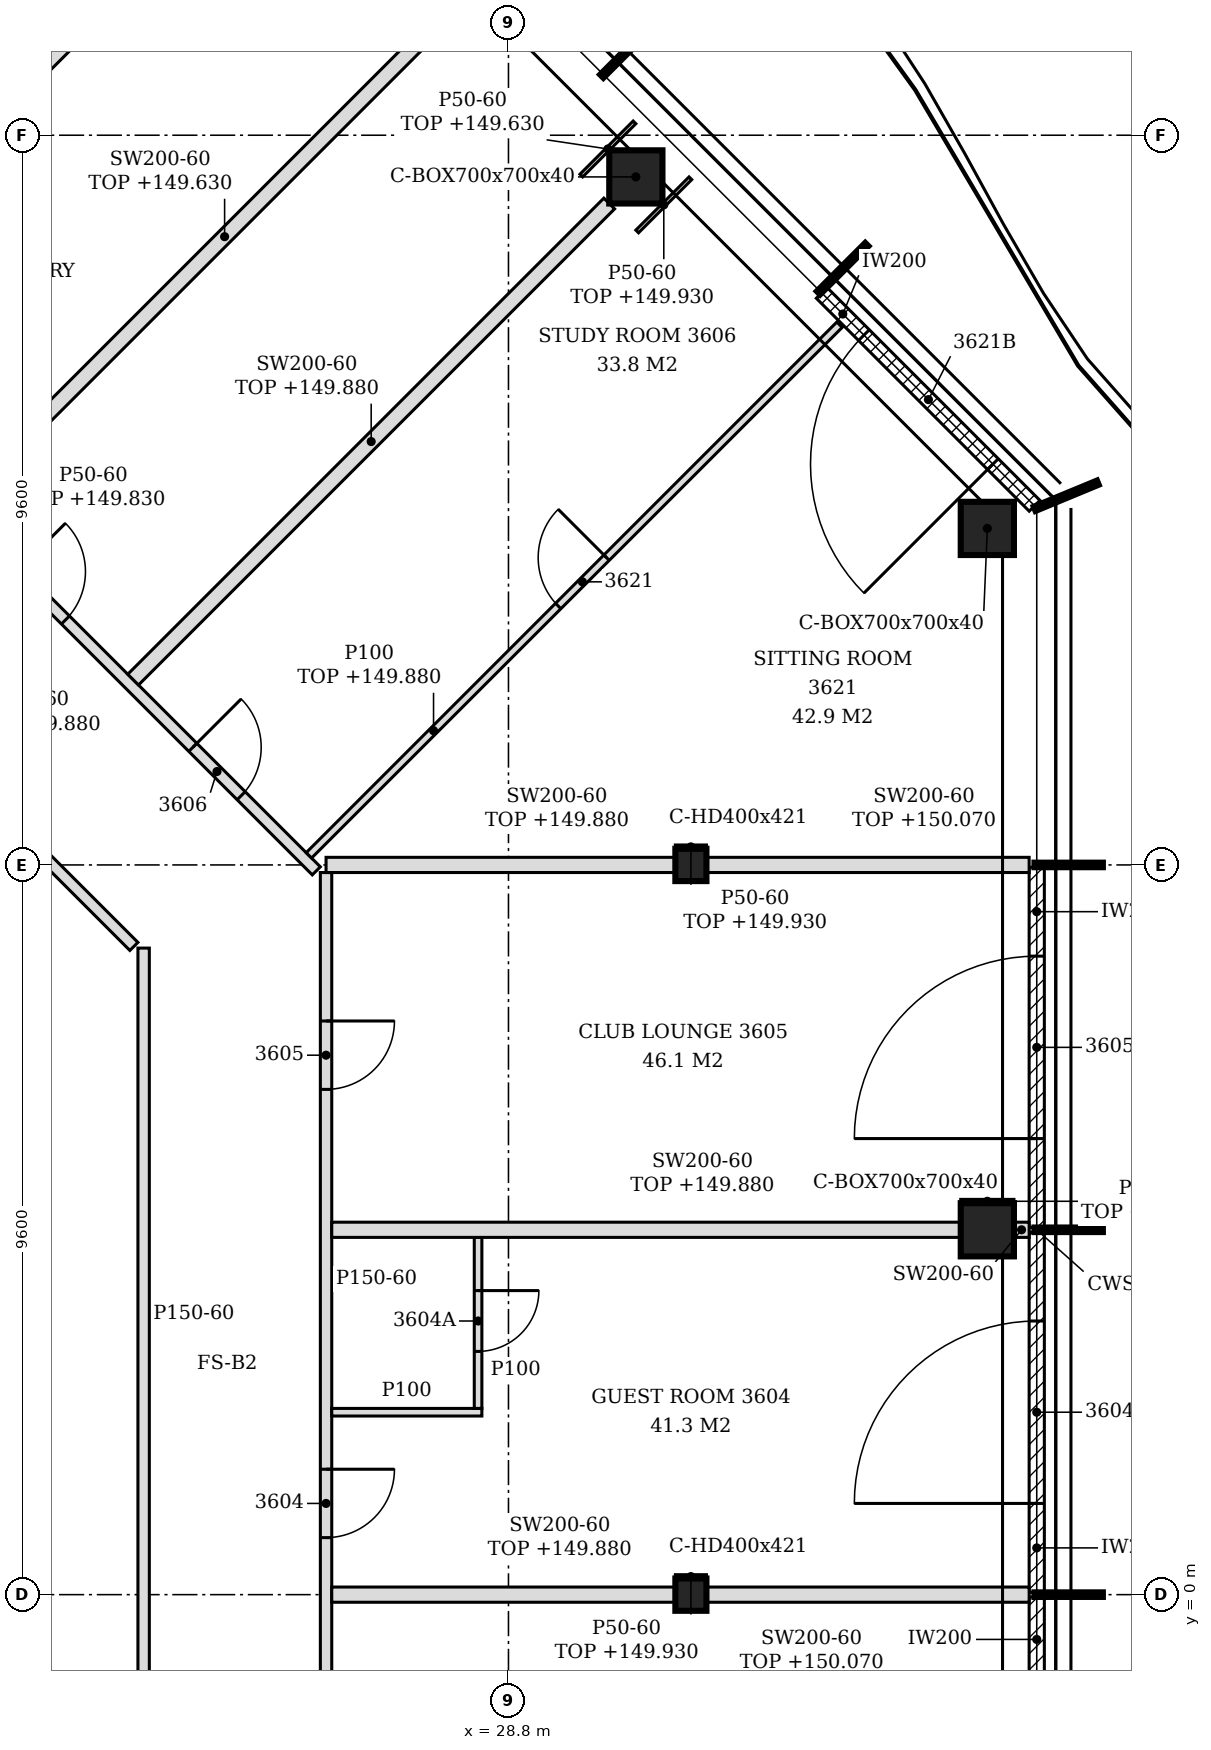
"""IFC4 building model, lengths in metres.
Left out: names, types, materials, properties, quantities, classifications, styles, units other than length and angle.
Written with IfcOpenShell. Run it as: python <this file> out.ifc"""

import sys

from ifc_helpers import new_model, si_unit, direction, frame, frame_2d, origin, origin_2d, place, context, subcontext, project, spatial, polyline, rectangle, hollow_rectangle, i_section, outline, extrude, element, fill, save


model = new_model("IFC4")
c1 = context("Model", 3, precision=1e-05, world=origin(), true_north=direction((0.0, 1.0)))
c2 = subcontext(c1, "Body", "Model", "MODEL_VIEW")
j1 = project(units=[si_unit("LENGTHUNIT", "METRE"), si_unit("PLANEANGLEUNIT", "RADIAN")], contexts=[c1])
p1 = place(None, origin())
s1 = spatial("IfcSite", under=j1, at=p1, CompositionType="ELEMENT")
p2 = place(p1, origin())
s2 = spatial("IfcBuilding", under=s1, at=p2, CompositionType="ELEMENT")
p3 = place(p2, frame((0.0, 0.0, 147.0)))
s3 = spatial("IfcBuildingStorey", under=s2, at=p3, CompositionType="ELEMENT", Elevation=147.0)
for number, where, z_axis, x_axis in (
    (1, (35.1, 4.8, -0.15), (0.0, 0.0, 1.0), (1.0, 0.0, 0.0)),
    (2, (35.1, 14.027, -0.15), (0.0, 0.0, 1.0), (1.0, 0.0, 0.0)),
    (3, (30.476, 18.652, -0.15), (0.0, 0.0, 1.0), (1.0, 0.0, 0.0)),
):
    element("IfcColumn", number, at=place(p3, frame(where, z_axis=z_axis, x_axis=x_axis)), inside=s3, PredefinedType="COLUMN", context=c2, shape_type="SweptSolid", body=[
        extrude(hollow_rectangle(XDim=0.7, YDim=0.7, WallThickness=0.04, at=origin_2d()), origin(), (0.0, 0.0, 1.0), 3.6),
    ])
for number, where, z_axis, x_axis in (
    (4, (31.2, 0.0, -0.15), (0.0, 0.0, 1.0), (1.0, 0.0, 0.0)),
    (5, (31.2, 9.6, -0.15), (0.0, 0.0, 1.0), (1.0, 0.0, 0.0)),
):
    element("IfcColumn", number, at=place(p3, frame(where, z_axis=z_axis, x_axis=x_axis)), inside=s3, PredefinedType="COLUMN", context=c2, shape_type="SweptSolid", body=[
        extrude(i_section(OverallWidth=0.409, OverallDepth=0.425, WebThickness=0.033, FlangeThickness=0.052, FilletRadius=0.015, at=origin_2d()), origin(), (0.0, 0.0, 1.0), 3.6),
    ])
p4 = place(p3, frame((35.75, -4.656, 0.0), z_axis=(0.0, 0.0, 1.0), x_axis=(0.0, 1.0, 0.0)))
e6 = element("IfcWall", 6, at=p4, inside=s3, PredefinedType="NOTDEFINED", context=c2, shape_type="SweptSolid", body=[
    extrude(rectangle(XDim=4.626, YDim=0.2, at=frame_2d((2.313, 0.0))), origin(), (0.0, 0.0, 1.0), 3.45),
])
p5 = place(p4, frame((1.108, 0.0, 0.0)))
e7 = element("IfcOpeningElement", 7, at=p5, cuts=e6, PredefinedType="OPENING", context=c2, shape_type="SweptSolid", body=[
    extrude(rectangle(XDim=2.4, YDim=2.4, at=frame_2d((1.2, 1.2))), frame((0.0, 0.11, 0.0), z_axis=(0.0, -1.0, 0.0), x_axis=(1.0, 0.0, 0.0)), (0.0, 0.0, 1.0), 0.22),
])
p6 = place(p3, frame((35.75, 0.03, 0.0), z_axis=(0.0, 0.0, 1.0), x_axis=(0.0, 1.0, 0.0)))
e8 = element("IfcWall", 8, at=p6, inside=s3, PredefinedType="NOTDEFINED", context=c2, shape_type="SweptSolid", body=[
    extrude(rectangle(XDim=4.74, YDim=0.2, at=frame_2d((2.37, 0.0))), origin(), (0.0, 0.0, 1.0), 3.45),
])
p7 = place(p6, frame((1.17, 0.0, 0.0)))
e9 = element("IfcOpeningElement", 9, at=p7, cuts=e8, PredefinedType="OPENING", context=c2, shape_type="SweptSolid", body=[
    extrude(rectangle(XDim=2.4, YDim=2.4, at=frame_2d((1.2, 1.2))), frame((0.0, 0.11, 0.0), z_axis=(0.0, -1.0, 0.0), x_axis=(1.0, 0.0, 0.0)), (0.0, 0.0, 1.0), 0.22),
])
p8 = place(p3, frame((35.75, 4.83, 0.0), z_axis=(0.0, 0.0, 1.0), x_axis=(0.0, 1.0, 0.0)))
e10 = element("IfcWall", 10, at=p8, inside=s3, PredefinedType="NOTDEFINED", context=c2, shape_type="SweptSolid", body=[
    extrude(rectangle(XDim=4.74, YDim=0.2, at=frame_2d((2.37, 0.0))), origin(), (0.0, 0.0, 1.0), 3.45),
])
p9 = place(p8, frame((1.17, 0.0, 0.0)))
e11 = element("IfcOpeningElement", 11, at=p9, cuts=e10, PredefinedType="OPENING", context=c2, shape_type="SweptSolid", body=[
    extrude(rectangle(XDim=2.4, YDim=2.4, at=frame_2d((1.2, 1.2))), frame((0.0, 0.11, 0.0), z_axis=(0.0, -1.0, 0.0), x_axis=(1.0, 0.0, 0.0)), (0.0, 0.0, 1.0), 0.22),
])
p10 = place(p3, frame((35.722, 14.325, 0.0), z_axis=(0.0, 0.0, 1.0), x_axis=(-0.707106781187, 0.707106781187, 0.0)))
e12 = element("IfcWall", 12, at=p10, inside=s3, PredefinedType="NOTDEFINED", context=c2, shape_type="SweptSolid", body=[
    extrude(rectangle(XDim=3.962, YDim=0.2, at=frame_2d((1.981, 0.0))), origin(), (0.0, 0.0, 1.0), 3.45),
])
p11 = place(p10, frame((0.775, 0.0, 0.0)))
e13 = element("IfcOpeningElement", 13, at=p11, cuts=e12, PredefinedType="OPENING", context=c2, shape_type="SweptSolid", body=[
    extrude(rectangle(XDim=2.4, YDim=2.4, at=frame_2d((1.2, 1.2))), frame((0.0, 0.11, 0.0), z_axis=(0.0, -1.0, 0.0), x_axis=(1.0, 0.0, 0.0)), (0.0, 0.0, 1.0), 0.22),
])
p12 = place(p3, frame((26.4, -4.448, 0.0), z_axis=(0.0, 0.0, 1.0), x_axis=(0.0, 1.0, 0.0)))
e14 = element("IfcWall", 14, at=p12, inside=s3, PredefinedType="PARTITIONING", context=c2, shape_type="SweptSolid", body=[
    extrude(outline(polyline([(0.0, 0.0), (13.948, 0.0), (13.948, 2.88), (13.943, 2.88), (13.941, 3.45), (9.353, 3.45), (9.351, 2.88), (9.143, 2.88), (9.141, 3.45), (4.553, 3.45), (4.551, 2.88), (4.343, 2.88), (4.341, 3.45), (0.0, 3.45), (0.0, 0.0)])), frame((0.0, 0.075, 0.0), z_axis=(0.0, -1.0, 0.0), x_axis=(1.0, 0.0, 0.0)), (0.0, 0.0, 1.0), 0.15),
])
p13 = place(p12, frame((1.701, 0.0, 0.0)))
e15 = element("IfcOpeningElement", 15, at=p13, cuts=e14, PredefinedType="OPENING", context=c2, shape_type="SweptSolid", body=[
    extrude(rectangle(XDim=0.9, YDim=2.1, at=frame_2d((0.45, 1.05))), frame((0.0, 0.085, 0.0), z_axis=(0.0, -1.0, 0.0), x_axis=(1.0, 0.0, 0.0)), (0.0, 0.0, 1.0), 0.17),
])
p14 = place(p12, frame((5.198, 0.0, 0.0)))
e16 = element("IfcOpeningElement", 16, at=p14, cuts=e14, PredefinedType="OPENING", context=c2, shape_type="SweptSolid", body=[
    extrude(rectangle(XDim=0.9, YDim=2.1, at=frame_2d((0.45, 1.05))), frame((0.0, 0.085, 0.0), z_axis=(0.0, -1.0, 0.0), x_axis=(1.0, 0.0, 0.0)), (0.0, 0.0, 1.0), 0.17),
])
p15 = place(p12, frame((11.095, 0.0, 0.0)))
e17 = element("IfcOpeningElement", 17, at=p15, cuts=e14, PredefinedType="OPENING", context=c2, shape_type="SweptSolid", body=[
    extrude(rectangle(XDim=0.9, YDim=2.1, at=frame_2d((0.45, 1.05))), frame((0.0, 0.085, 0.0), z_axis=(0.0, -1.0, 0.0), x_axis=(1.0, 0.0, 0.0)), (0.0, 0.0, 1.0), 0.17),
])
p16 = place(p3, frame((24.0, -1.125, 0.0), z_axis=(0.0, 0.0, 1.0), x_axis=(0.0, 1.0, 0.0)))
e18 = element("IfcWall", 18, at=p16, inside=s3, PredefinedType="PARTITIONING", context=c2, shape_type="SweptSolid", body=[
    extrude(outline(polyline([(0.0, 0.0), (9.631, 0.0), (9.631, 3.45), (6.03, 3.45), (6.028, 2.88), (5.82, 2.88), (5.818, 3.45), (1.23, 3.45), (1.228, 2.88), (1.02, 2.88), (1.018, 3.45), (0.0, 3.45), (0.0, 0.0)])), frame((0.0, 0.075, 0.0), z_axis=(0.0, -1.0, 0.0), x_axis=(1.0, 0.0, 0.0)), (0.0, 0.0, 1.0), 0.15),
])
p17 = place(p3, frame((26.475, 0.0, 0.0), z_axis=(0.0, 0.0, 1.0), x_axis=(1.0, 0.0, 0.0)))
e19 = element("IfcWall", 19, at=p17, inside=s3, PredefinedType="PARTITIONING", context=c2, shape_type="SweptSolid", body=[
    extrude(rectangle(XDim=4.521, YDim=0.2, at=frame_2d((2.26, 0.0))), origin(), (0.0, 0.0, 1.0), 2.88),
])
p18 = place(p3, frame((31.405, 0.0, 0.0), z_axis=(0.0, 0.0, 1.0), x_axis=(1.0, 0.0, 0.0)))
e20 = element("IfcWall", 20, at=p18, inside=s3, PredefinedType="PARTITIONING", context=c2, shape_type="SweptSolid", body=[
    extrude(outline(polyline([(0.0, 0.0), (4.245, 0.0), (4.246, 3.07), (3.845, 3.07), (3.844, 2.93), (3.545, 2.93), (3.543, 3.07), (0.0, 3.07), (0.0, 0.0)])), frame((0.0, 0.1, 0.0), z_axis=(0.0, -1.0, 0.0), x_axis=(1.0, 0.0, 0.0)), (0.0, 0.0, 1.0), 0.2),
])
p19 = place(p3, frame((26.475, 2.4, 0.0), z_axis=(0.0, 0.0, 1.0), x_axis=(1.0, 0.0, 0.0)))
e21 = element("IfcWall", 21, at=p19, inside=s3, PredefinedType="PARTITIONING", context=c2, shape_type="SweptSolid", body=[
    extrude(rectangle(XDim=1.975, YDim=0.1, at=frame_2d((0.987, 0.0))), origin(), (0.0, 0.0, 1.0), 3.45),
])
p20 = place(p3, frame((28.4, 2.45, 0.0), z_axis=(0.0, 0.0, 1.0), x_axis=(0.0, 1.0, 0.0)))
e22 = element("IfcWall", 22, at=p20, inside=s3, PredefinedType="PARTITIONING", context=c2, shape_type="SweptSolid", body=[
    extrude(outline(polyline([(0.0, 0.0), (2.25, 0.0), (2.25, 2.88), (2.245, 2.88), (2.243, 3.45), (0.0, 3.45), (0.0, 0.0)])), frame((0.0, 0.05, 0.0), z_axis=(0.0, -1.0, 0.0), x_axis=(1.0, 0.0, 0.0)), (0.0, 0.0, 1.0), 0.1),
])
p21 = place(p20, frame((0.75, 0.0, 0.0)))
e23 = element("IfcOpeningElement", 23, at=p21, cuts=e22, PredefinedType="OPENING", context=c2, shape_type="SweptSolid", body=[
    extrude(rectangle(XDim=0.8, YDim=2.1, at=frame_2d((0.4, 1.05))), frame((0.0, 0.06, 0.0), z_axis=(0.0, -1.0, 0.0), x_axis=(1.0, 0.0, 0.0)), (0.0, 0.0, 1.0), 0.12),
])
p22 = place(p3, frame((26.475, 4.8, 0.0), z_axis=(0.0, 0.0, 1.0), x_axis=(1.0, 0.0, 0.0)))
e24 = element("IfcWall", 24, at=p22, inside=s3, PredefinedType="PARTITIONING", context=c2, shape_type="SweptSolid", body=[
    extrude(rectangle(XDim=8.275, YDim=0.2, at=frame_2d((4.137, 0.0))), origin(), (0.0, 0.0, 1.0), 2.88),
])
p23 = place(p3, frame((35.45, 4.8, 0.0), z_axis=(0.0, 0.0, 1.0), x_axis=(1.0, 0.0, 0.0)))
e25 = element("IfcWall", 25, at=p23, inside=s3, PredefinedType="PARTITIONING", context=c2, shape_type="SweptSolid", body=[
    extrude(rectangle(XDim=0.2, YDim=0.2, at=frame_2d((0.1, 0.0))), origin(), (0.0, 0.0, 1.0), 3.45),
])
p24 = place(p3, frame((23.872, 8.528, 0.0), z_axis=(0.0, 0.0, 1.0), x_axis=(-0.707126119272, 0.707087442572, 0.0)))
e26 = element("IfcWall", 26, at=p24, inside=s3, PredefinedType="PARTITIONING", context=c2, shape_type="SweptSolid", body=[
    extrude(rectangle(XDim=6.312, YDim=0.15, at=frame_2d((3.156, 0.0))), origin(), (0.0, 0.0, 1.0), 2.88),
])
p25 = place(p3, frame((26.272, 9.522, 0.0), z_axis=(0.0, 0.0, 1.0), x_axis=(-0.707097742657, 0.707115819601, 0.0)))
e27 = element("IfcWall", 27, at=p25, inside=s3, PredefinedType="PARTITIONING", context=c2, shape_type="SweptSolid", body=[
    extrude(rectangle(XDim=13.506, YDim=0.15, at=frame_2d((6.753, 0.0))), origin(), (0.0, 0.0, 1.0), 2.73),
])
p26 = place(p25, frame((1.398, 0.0, 0.0)))
e28 = element("IfcOpeningElement", 28, at=p26, cuts=e27, PredefinedType="OPENING", context=c2, shape_type="SweptSolid", body=[
    extrude(rectangle(XDim=0.9, YDim=2.1, at=frame_2d((0.45, 1.05))), frame((0.0, 0.085, 0.0), z_axis=(0.0, -1.0, 0.0), x_axis=(1.0, 0.0, 0.0)), (0.0, 0.0, 1.0), 0.17),
])
p27 = place(p25, frame((4.668, 0.0, 0.0)))
e29 = element("IfcOpeningElement", 29, at=p27, cuts=e27, PredefinedType="OPENING", context=c2, shape_type="SweptSolid", body=[
    extrude(rectangle(XDim=0.9, YDim=2.1, at=frame_2d((0.45, 1.05))), frame((0.0, 0.085, 0.0), z_axis=(0.0, -1.0, 0.0), x_axis=(1.0, 0.0, 0.0)), (0.0, 0.0, 1.0), 0.17),
])
p28 = place(p25, frame((7.938, 0.0, 0.0)))
e30 = element("IfcOpeningElement", 30, at=p28, cuts=e27, PredefinedType="OPENING", context=c2, shape_type="SweptSolid", body=[
    extrude(rectangle(XDim=0.9, YDim=2.1, at=frame_2d((0.45, 1.05))), frame((0.0, 0.085, 0.0), z_axis=(0.0, -1.0, 0.0), x_axis=(1.0, 0.0, 0.0)), (0.0, 0.0, 1.0), 0.17),
])
p29 = place(p25, frame((11.405, 0.0, 0.0)))
e31 = element("IfcOpeningElement", 31, at=p29, cuts=e27, PredefinedType="OPENING", context=c2, shape_type="SweptSolid", body=[
    extrude(rectangle(XDim=0.9, YDim=2.1, at=frame_2d((0.45, 1.05))), frame((0.0, 0.085, 0.0), z_axis=(0.0, -1.0, 0.0), x_axis=(1.0, 0.0, 0.0)), (0.0, 0.0, 1.0), 0.17),
])
p30 = place(p3, frame((26.4, 9.6, 0.0), z_axis=(0.0, 0.0, 1.0), x_axis=(1.0, 0.0, 0.0)))
e32 = element("IfcWall", 32, at=p30, inside=s3, PredefinedType="PARTITIONING", context=c2, shape_type="SweptSolid", body=[
    extrude(rectangle(XDim=4.595, YDim=0.2, at=frame_2d((2.298, 0.0))), origin(), (0.0, 0.0, 1.0), 2.88),
])
p31 = place(p3, frame((31.405, 9.6, 0.0), z_axis=(0.0, 0.0, 1.0), x_axis=(1.0, 0.0, 0.0)))
e33 = element("IfcWall", 33, at=p31, inside=s3, PredefinedType="PARTITIONING", context=c2, shape_type="SweptSolid", body=[
    extrude(outline(polyline([(0.0, 0.0), (4.245, 0.0), (4.246, 3.07), (3.845, 3.07), (3.844, 2.93), (3.545, 2.93), (3.543, 3.07), (0.0, 3.07), (0.0, 0.0)])), frame((0.0, 0.1, 0.0), z_axis=(0.0, -1.0, 0.0), x_axis=(1.0, 0.0, 0.0)), (0.0, 0.0, 1.0), 0.2),
])
p32 = place(p3, frame((26.174, 9.726, 0.0), z_axis=(0.0, 0.0, 1.0), x_axis=(0.707106781187, 0.707106781187, 0.0)))
e34 = element("IfcWall", 34, at=p32, inside=s3, PredefinedType="PARTITIONING", context=c2, shape_type="SweptSolid", body=[
    extrude(rectangle(XDim=9.873, YDim=0.1, at=frame_2d((4.937, 0.0))), origin(), (0.0, 0.0, 1.0), 2.88),
])
p33 = place(p32, frame((4.639, 0.0, 0.0)))
e35 = element("IfcOpeningElement", 35, at=p33, cuts=e34, PredefinedType="OPENING", context=c2, shape_type="SweptSolid", body=[
    extrude(rectangle(XDim=0.9, YDim=2.1, at=frame_2d((0.45, 1.05))), frame((0.0, 0.06, 0.0), z_axis=(0.0, -1.0, 0.0), x_axis=(1.0, 0.0, 0.0)), (0.0, 0.0, 1.0), 0.12),
])
p34 = place(p3, frame((23.862, 12.038, 0.0), z_axis=(0.0, 0.0, 1.0), x_axis=(0.707106781187, 0.707106781187, 0.0)))
e36 = element("IfcWall", 36, at=p34, inside=s3, PredefinedType="PARTITIONING", context=c2, shape_type="SweptSolid", body=[
    extrude(rectangle(XDim=8.858, YDim=0.2, at=frame_2d((4.429, 0.0))), origin(), (0.0, 0.0, 1.0), 2.88),
])
p35 = place(p3, frame((21.55, 14.35, 0.0), z_axis=(0.0, 0.0, 1.0), x_axis=(0.707106781187, 0.707106781187, 0.0)))
e37 = element("IfcWall", 37, at=p35, inside=s3, PredefinedType="PARTITIONING", context=c2, shape_type="SweptSolid", body=[
    extrude(rectangle(XDim=9.943, YDim=0.2, at=frame_2d((4.972, 0.0))), origin(), (0.0, 0.0, 1.0), 2.63),
])
p36 = place(p3, frame((19.238, 16.662, 0.0), z_axis=(0.0, 0.0, 1.0), x_axis=(0.707120561855, 0.707093000249, 0.0)))
e38 = element("IfcWall", 38, at=p36, inside=s3, PredefinedType="PARTITIONING", context=c2, shape_type="SweptSolid", body=[
    extrude(rectangle(XDim=8.858, YDim=0.2, at=frame_2d((4.429, 0.0))), origin(), (0.0, 0.0, 1.0), 2.73),
])
p37 = place(p3, frame((30.996, 0.238, 0.0), z_axis=(0.0, 0.0, 1.0), x_axis=(1.0, 0.0, 0.0)))
e39 = element("IfcWall", 39, at=p37, inside=s3, PredefinedType="PARTITIONING", context=c2, shape_type="SweptSolid", body=[
    extrude(rectangle(XDim=0.409, YDim=0.05, at=frame_2d((0.205, 0.0))), origin(), (0.0, 0.0, 1.0), 2.93),
])
p38 = place(p3, frame((34.75, 5.175, 0.0), z_axis=(0.0, 0.0, 1.0), x_axis=(1.0, 0.0, 0.0)))
e40 = element("IfcWall", 40, at=p38, inside=s3, PredefinedType="PARTITIONING", context=c2, shape_type="SweptSolid", body=[
    extrude(rectangle(XDim=0.7, YDim=0.05, at=frame_2d((0.35, 0.0))), origin(), (0.0, 0.0, 1.0), 2.93),
])
p39 = place(p3, frame((30.996, 9.837, 0.0), z_axis=(0.0, 0.0, 1.0), x_axis=(1.0, 0.0, 0.0)))
e41 = element("IfcWall", 41, at=p39, inside=s3, PredefinedType="PARTITIONING", context=c2, shape_type="SweptSolid", body=[
    extrude(rectangle(XDim=0.409, YDim=0.05, at=frame_2d((0.205, 0.0))), origin(), (0.0, 0.0, 1.0), 2.93),
])
p40 = place(p3, frame((29.758, 18.669, 0.0), z_axis=(0.0, 0.0, 1.0), x_axis=(0.707106781187, 0.707106781187, 0.0)))
e42 = element("IfcWall", 42, at=p40, inside=s3, PredefinedType="PARTITIONING", context=c2, shape_type="SweptSolid", body=[
    extrude(rectangle(XDim=0.99, YDim=0.05, at=frame_2d((0.495, 0.0))), origin(), (0.0, 0.0, 1.0), 2.63),
])
p41 = place(p3, frame((30.493, 17.934, 0.0), z_axis=(0.0, 0.0, 1.0), x_axis=(0.707106781187, 0.707106781187, 0.0)))
e43 = element("IfcWall", 43, at=p41, inside=s3, PredefinedType="PARTITIONING", context=c2, shape_type="SweptSolid", body=[
    extrude(rectangle(XDim=0.99, YDim=0.05, at=frame_2d((0.495, 0.0))), origin(), (0.0, 0.0, 1.0), 2.93),
])
p42 = place(p7, origin())
e44 = element("IfcDoor", 44, at=p42, inside=s3, OperationType="SINGLE_SWING_LEFT", PredefinedType="DOOR", context=c2, shape_type="SweptSolid", body=[
    extrude(rectangle(XDim=2.4, YDim=2.4, at=frame_2d((1.2, 1.2))), frame((0.0, 0.025, 0.0), z_axis=(0.0, -1.0, 0.0), x_axis=(1.0, 0.0, 0.0)), (0.0, 0.0, 1.0), 0.05),
])
fill(e9, e44)
p43 = place(p9, origin())
e45 = element("IfcDoor", 45, at=p43, inside=s3, OperationType="SINGLE_SWING_LEFT", PredefinedType="DOOR", context=c2, shape_type="SweptSolid", body=[
    extrude(rectangle(XDim=2.4, YDim=2.4, at=frame_2d((1.2, 1.2))), frame((0.0, 0.025, 0.0), z_axis=(0.0, -1.0, 0.0), x_axis=(1.0, 0.0, 0.0)), (0.0, 0.0, 1.0), 0.05),
])
fill(e11, e45)
p44 = place(p11, origin())
e46 = element("IfcDoor", 46, at=p44, inside=s3, OperationType="SINGLE_SWING_LEFT", PredefinedType="DOOR", context=c2, shape_type="SweptSolid", body=[
    extrude(rectangle(XDim=2.4, YDim=2.4, at=frame_2d((1.2, 1.2))), frame((0.0, 0.025, 0.0), z_axis=(0.0, -1.0, 0.0), x_axis=(1.0, 0.0, 0.0)), (0.0, 0.0, 1.0), 0.05),
])
fill(e13, e46)
p45 = place(p14, frame((0.9, 0.0, 0.0), z_axis=(0.0, 0.0, 1.0), x_axis=(-1.0, 0.0, 0.0)))
e47 = element("IfcDoor", 47, at=p45, inside=s3, OperationType="SINGLE_SWING_LEFT", PredefinedType="DOOR", context=c2, shape_type="SweptSolid", body=[
    extrude(rectangle(XDim=0.9, YDim=2.1, at=frame_2d((0.45, 1.05))), frame((0.0, 0.025, 0.0), z_axis=(0.0, -1.0, 0.0), x_axis=(1.0, 0.0, 0.0)), (0.0, 0.0, 1.0), 0.05),
])
fill(e16, e47)
p46 = place(p21, frame((0.8, 0.0, 0.0), z_axis=(0.0, 0.0, 1.0), x_axis=(-1.0, 0.0, 0.0)))
e48 = element("IfcDoor", 48, at=p46, inside=s3, OperationType="SINGLE_SWING_LEFT", PredefinedType="DOOR", context=c2, shape_type="SweptSolid", body=[
    extrude(rectangle(XDim=0.8, YDim=2.1, at=frame_2d((0.4, 1.05))), frame((0.0, 0.025, 0.0), z_axis=(0.0, -1.0, 0.0), x_axis=(1.0, 0.0, 0.0)), (0.0, 0.0, 1.0), 0.05),
])
fill(e23, e48)
p47 = place(p15, frame((0.9, 0.0, 0.0), z_axis=(0.0, 0.0, 1.0), x_axis=(-1.0, 0.0, 0.0)))
e49 = element("IfcDoor", 49, at=p47, inside=s3, OperationType="SINGLE_SWING_LEFT", PredefinedType="DOOR", context=c2, shape_type="SweptSolid", body=[
    extrude(rectangle(XDim=0.9, YDim=2.1, at=frame_2d((0.45, 1.05))), frame((0.0, 0.025, 0.0), z_axis=(0.0, -1.0, 0.0), x_axis=(1.0, 0.0, 0.0)), (0.0, 0.0, 1.0), 0.05),
])
fill(e17, e49)
p48 = place(p26, frame((0.9, 0.0, 0.0), z_axis=(0.0, 0.0, 1.0), x_axis=(-1.0, 0.0, 0.0)))
e50 = element("IfcDoor", 50, at=p48, inside=s3, OperationType="SINGLE_SWING_LEFT", PredefinedType="DOOR", context=c2, shape_type="SweptSolid", body=[
    extrude(rectangle(XDim=0.9, YDim=2.1, at=frame_2d((0.45, 1.05))), frame((0.0, 0.025, 0.0), z_axis=(0.0, -1.0, 0.0), x_axis=(1.0, 0.0, 0.0)), (0.0, 0.0, 1.0), 0.05),
])
fill(e28, e50)
p49 = place(p27, frame((0.9, 0.0, 0.0), z_axis=(0.0, 0.0, 1.0), x_axis=(-1.0, 0.0, 0.0)))
e51 = element("IfcDoor", 51, at=p49, inside=s3, OperationType="SINGLE_SWING_LEFT", PredefinedType="DOOR", context=c2, shape_type="SweptSolid", body=[
    extrude(rectangle(XDim=0.9, YDim=2.1, at=frame_2d((0.45, 1.05))), frame((0.0, 0.025, 0.0), z_axis=(0.0, -1.0, 0.0), x_axis=(1.0, 0.0, 0.0)), (0.0, 0.0, 1.0), 0.05),
])
fill(e29, e51)
p50 = place(p33, origin())
e52 = element("IfcDoor", 52, at=p50, inside=s3, OperationType="SINGLE_SWING_RIGHT", PredefinedType="DOOR", context=c2, shape_type="SweptSolid", body=[
    extrude(rectangle(XDim=0.9, YDim=2.1, at=frame_2d((0.45, 1.05))), frame((0.0, 0.025, 0.0), z_axis=(0.0, -1.0, 0.0), x_axis=(1.0, 0.0, 0.0)), (0.0, 0.0, 1.0), 0.05),
])
fill(e35, e52)
save(model, sys.argv[1])
